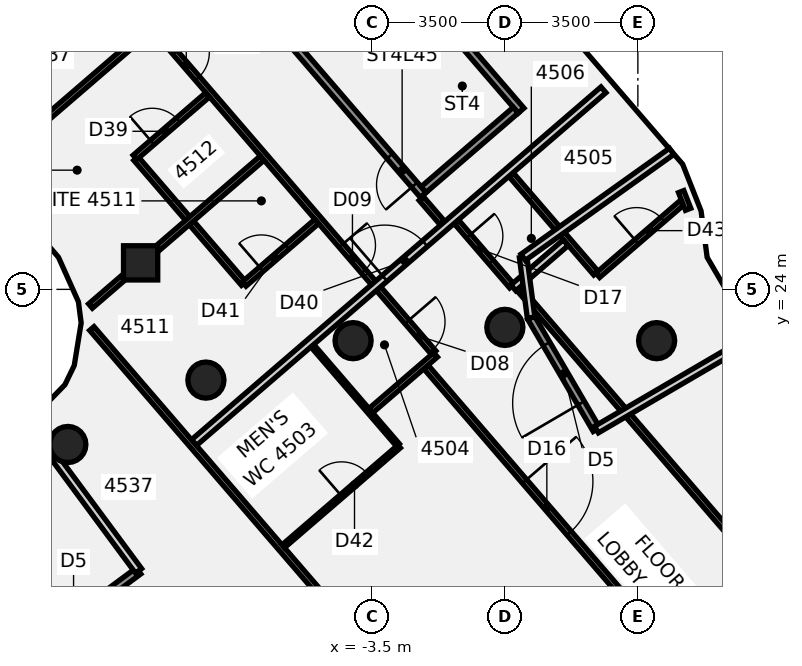
"""IFC4 building model, lengths in metres.
Left out: names, types, materials, properties, quantities, classifications, styles, units other than length and angle.
Written with IfcOpenShell. Run it as: python <this file> out.ifc"""

import sys

from ifc_helpers import new_model, si_unit, direction, frame, frame_2d, origin, origin_2d, place, context, subcontext, project, spatial, rectangle, circle, extrude, element, fill, save


model = new_model("IFC4")
c1 = context("Model", 3, precision=1e-05, world=origin(), true_north=direction((0.0, 1.0)))
c2 = subcontext(c1, "Body", "Model", "MODEL_VIEW")
j1 = project(units=[si_unit("LENGTHUNIT", "METRE"), si_unit("PLANEANGLEUNIT", "RADIAN")], contexts=[c1])
p1 = place(None, origin())
s1 = spatial("IfcSite", under=j1, at=p1, CompositionType="ELEMENT")
p2 = place(p1, origin())
s2 = spatial("IfcBuilding", under=s1, at=p2, CompositionType="ELEMENT")
p3 = place(p2, frame((0.0, 0.0, 182.5)))
s3 = spatial("IfcBuildingStorey", under=s2, at=p3, CompositionType="ELEMENT", Elevation=182.5)
for number, where, z_axis, x_axis in (
    (1, (3.994, 22.651, -0.14), (0.0, 0.0, 1.0), (1.0, 0.0, 0.0)),
    (2, (0.0, 23.0, -0.14), (0.0, 0.0, 1.0), (1.0, 0.0, 0.0)),
    (3, (-3.994, 22.651, -0.14), (0.0, 0.0, 1.0), (1.0, 0.0, 0.0)),
    (4, (-7.866, 21.613, -0.14), (0.0, 0.0, 1.0), (1.0, 0.0, 0.0)),
    (5, (-11.5, 19.919, -0.14), (0.0, 0.0, 1.0), (1.0, 0.0, 0.0)),
):
    element("IfcColumn", number, at=place(p3, frame(where, z_axis=z_axis, x_axis=x_axis)), inside=s3, PredefinedType="COLUMN", context=c2, shape_type="SweptSolid", body=[
        extrude(circle(Radius=0.475, at=origin_2d()), origin(), (0.0, 0.0, 1.0), 3.6),
    ])
p4 = place(p3, frame((-9.584, 24.698, -0.135), z_axis=(-0.013229584391, -0.048576320124, 0.998731855515), x_axis=(0.757717932984, 0.651247732409, 0.04171240903)))
e6 = element("IfcColumn", 6, at=p4, inside=s3, PredefinedType="COLUMN", context=c2, shape_type="SweptSolid", body=[
    extrude(rectangle(XDim=0.9, YDim=0.9, at=origin_2d()), origin(), (0.0, 0.0, 1.0), 3.599),
])
p5 = place(p3, frame((-9.706, 27.443, 0.0), z_axis=(0.0, 0.0, 1.0), x_axis=(0.652665803923, -0.757645925475, 0.0)))
e7 = element("IfcWall", 7, at=p5, inside=s3, PredefinedType="PARTITIONING", context=c2, shape_type="SweptSolid", body=[
    extrude(rectangle(XDim=4.34, YDim=0.15, at=frame_2d((2.17, 0.0))), origin(), (0.0, 0.0, 1.0), 2.864),
])
p6 = place(p3, frame((-12.149, 34.262, 0.0), z_axis=(0.0, 0.0, 1.0), x_axis=(0.652651241908, -0.75765846952, 0.0)))
e8 = element("IfcWall", 8, at=p6, inside=s3, PredefinedType="PARTITIONING", context=c2, shape_type="SweptSolid", body=[
    extrude(rectangle(XDim=15.745, YDim=0.15, at=frame_2d((7.873, 0.0))), origin(), (0.0, 0.0, 1.0), 2.864),
])
p7 = place(p6, frame((14.67, 0.0, 0.0)))
e9 = element("IfcOpeningElement", 9, at=p7, cuts=e8, PredefinedType="OPENING", context=c2, shape_type="SweptSolid", body=[
    extrude(rectangle(XDim=1.0, YDim=2.1, at=frame_2d((0.5, 1.05))), frame((0.0, 0.085, 0.0), z_axis=(0.0, -1.0, 0.0), x_axis=(1.0, 0.0, 0.0)), (0.0, 0.0, 1.0), 0.17),
])
p8 = place(p6, frame((12.02, 0.0, 0.0)))
e10 = element("IfcOpeningElement", 10, at=p8, cuts=e8, PredefinedType="OPENING", context=c2, shape_type="SweptSolid", body=[
    extrude(rectangle(XDim=0.9, YDim=2.1, at=frame_2d((0.45, 1.05))), frame((0.0, 0.085, 0.0), z_axis=(0.0, -1.0, 0.0), x_axis=(1.0, 0.0, 0.0)), (0.0, 0.0, 1.0), 0.17),
])
p9 = place(p6, frame((5.32, 0.0, 0.0)))
e11 = element("IfcOpeningElement", 11, at=p9, cuts=e8, PredefinedType="OPENING", context=c2, shape_type="SweptSolid", body=[
    extrude(rectangle(XDim=0.9, YDim=2.1, at=frame_2d((0.45, 1.05))), frame((0.0, 0.085, 0.0), z_axis=(0.0, -1.0, 0.0), x_axis=(1.0, 0.0, 0.0)), (0.0, 0.0, 1.0), 0.17),
])
p10 = place(p6, frame((3.02, 0.0, 0.0)))
e12 = element("IfcOpeningElement", 12, at=p10, cuts=e8, PredefinedType="OPENING", context=c2, shape_type="SweptSolid", body=[
    extrude(rectangle(XDim=0.9, YDim=2.1, at=frame_2d((0.45, 1.05))), frame((0.0, 0.085, 0.0), z_axis=(0.0, -1.0, 0.0), x_axis=(1.0, 0.0, 0.0)), (0.0, 0.0, 1.0), 0.17),
])
p11 = place(p3, frame((-10.868, 22.97, 0.0), z_axis=(0.0, 0.0, 1.0), x_axis=(0.652748053076, -0.757575065063, 0.0)))
e13 = element("IfcWall", 13, at=p11, inside=s3, PredefinedType="PARTITIONING", context=c2, shape_type="SweptSolid", body=[
    extrude(rectangle(XDim=14.472, YDim=0.15, at=frame_2d((7.236, 0.0))), origin(), (0.0, 0.0, 1.0), 2.864),
])
p12 = place(p3, frame((-2.198, 26.39, 0.0), z_axis=(0.0, 0.0, 1.0), x_axis=(0.652726981175, -0.757593220697, 0.0)))
e14 = element("IfcWall", 14, at=p12, inside=s3, PredefinedType="PARTITIONING", context=c2, shape_type="SweptSolid", body=[
    extrude(rectangle(XDim=0.84, YDim=0.15, at=frame_2d((0.42, 0.0))), origin(), (0.0, 0.0, 1.0), 2.864),
])
p13 = place(p3, frame((-5.067, 22.518, 0.0), z_axis=(0.0, 0.0, 1.0), x_axis=(0.652759016161, -0.757565618821, 0.0)))
e15 = element("IfcWall", 15, at=p13, inside=s3, PredefinedType="PARTITIONING", context=c2, shape_type="SweptSolid", body=[
    extrude(rectangle(XDim=3.45, YDim=0.1, at=frame_2d((1.725, 0.0))), origin(), (0.0, 0.0, 1.0), 2.864),
])
p14 = place(p3, frame((-2.074, 21.955, 0.0), z_axis=(0.0, 0.0, 1.0), x_axis=(0.652736603542, -0.757584930154, 0.0)))
e16 = element("IfcWall", 16, at=p14, inside=s3, PredefinedType="PARTITIONING", context=c2, shape_type="SweptSolid", body=[
    extrude(rectangle(XDim=13.133, YDim=0.15, at=frame_2d((6.566, 0.0))), origin(), (0.0, 0.0, 1.0), 2.864),
])
p15 = place(p14, frame((3.97, 0.0, 0.0)))
e17 = element("IfcOpeningElement", 17, at=p15, cuts=e16, PredefinedType="OPENING", context=c2, shape_type="SweptSolid", body=[
    extrude(rectangle(XDim=1.8, YDim=2.1, at=frame_2d((0.9, 1.05))), frame((0.0, 0.085, 0.0), z_axis=(0.0, -1.0, 0.0), x_axis=(1.0, 0.0, 0.0)), (0.0, 0.0, 1.0), 0.17),
])
p16 = place(p3, frame((-1.266, 25.767, 0.0), z_axis=(0.0, 0.0, 1.0), x_axis=(0.652880885414, -0.757460592679, 0.0)))
e18 = element("IfcWall", 18, at=p16, inside=s3, PredefinedType="PARTITIONING", context=c2, shape_type="SweptSolid", body=[
    extrude(rectangle(XDim=2.22, YDim=0.15, at=frame_2d((1.11, 0.0))), origin(), (0.0, 0.0, 1.0), 2.864),
])
p17 = place(p16, frame((0.48, 0.0, 0.0)))
e19 = element("IfcOpeningElement", 19, at=p17, cuts=e18, PredefinedType="OPENING", context=c2, shape_type="SweptSolid", body=[
    extrude(rectangle(XDim=0.9, YDim=2.1, at=frame_2d((0.45, 1.05))), frame((0.0, 0.085, 0.0), z_axis=(0.0, -1.0, 0.0), x_axis=(1.0, 0.0, 0.0)), (0.0, 0.0, 1.0), 0.17),
])
p18 = place(p3, frame((0.173, 27.007, 0.0), z_axis=(0.0, 0.0, 1.0), x_axis=(0.652861605441, -0.757477210311, 0.0)))
e20 = element("IfcWall", 20, at=p18, inside=s3, PredefinedType="PARTITIONING", context=c2, shape_type="SweptSolid", body=[
    extrude(rectangle(XDim=3.405, YDim=0.15, at=frame_2d((1.702, 0.0))), origin(), (0.0, 0.0, 1.0), 2.864),
])
p19 = place(p3, frame((0.376, 24.014, 0.0), z_axis=(0.0, 0.0, 1.0), x_axis=(0.652727037731, -0.75759317197, 0.0)))
e21 = element("IfcWall", 21, at=p19, inside=s3, PredefinedType="PARTITIONING", context=c2, shape_type="SweptSolid", body=[
    extrude(rectangle(XDim=15.2, YDim=0.15, at=frame_2d((7.6, 0.0))), origin(), (0.0, 0.0, 1.0), 2.864),
])
p20 = place(p19, frame((9.33, 0.0, 0.0)))
e22 = element("IfcOpeningElement", 22, at=p20, cuts=e21, PredefinedType="OPENING", context=c2, shape_type="SweptSolid", body=[
    extrude(rectangle(XDim=0.9, YDim=2.1, at=frame_2d((0.45, 1.05))), frame((0.0, 0.085, 0.0), z_axis=(0.0, -1.0, 0.0), x_axis=(1.0, 0.0, 0.0)), (0.0, 0.0, 1.0), 0.17),
])
p21 = place(p3, frame((-13.455, 27.303, 0.0), z_axis=(0.0, 0.0, 1.0), x_axis=(0.757581773841, 0.652740266832, 0.0)))
e23 = element("IfcWall", 23, at=p21, inside=s3, PredefinedType="PARTITIONING", context=c2, shape_type="SweptSolid", body=[
    extrude(rectangle(XDim=5.451, YDim=0.15, at=frame_2d((2.726, 0.0))), origin(), (0.0, 0.0, 1.0), 2.864),
])
p22 = place(p3, frame((-10.904, 23.561, 0.0), z_axis=(0.0, 0.0, 1.0), x_axis=(0.757575802877, 0.652747196773, 0.0)))
e24 = element("IfcWall", 24, at=p22, inside=s3, PredefinedType="PARTITIONING", context=c2, shape_type="SweptSolid", body=[
    extrude(rectangle(XDim=1.13, YDim=0.15, at=frame_2d((0.565, 0.0))), origin(), (0.0, 0.0, 1.0), 2.864),
])
p23 = place(p3, frame((-9.24, 24.994, 0.0), z_axis=(0.0, 0.0, 1.0), x_axis=(0.757602279322, 0.652716467056, 0.0)))
e25 = element("IfcWall", 25, at=p23, inside=s3, PredefinedType="PARTITIONING", context=c2, shape_type="SweptSolid", body=[
    extrude(rectangle(XDim=3.766, YDim=0.15, at=frame_2d((1.883, 0.0))), origin(), (0.0, 0.0, 1.0), 2.864),
])
p24 = place(p3, frame((-9.732, 27.474, 0.0), z_axis=(0.0, 0.0, 1.0), x_axis=(0.757495885979, 0.652839936528, 0.0)))
e26 = element("IfcWall", 26, at=p24, inside=s3, PredefinedType="PARTITIONING", context=c2, shape_type="SweptSolid", body=[
    extrude(rectangle(XDim=2.52, YDim=0.15, at=frame_2d((1.26, 0.0))), origin(), (0.0, 0.0, 1.0), 2.864),
])
p25 = place(p24, frame((0.6, 0.0, 0.0)))
e27 = element("IfcOpeningElement", 27, at=p25, cuts=e26, PredefinedType="OPENING", context=c2, shape_type="SweptSolid", body=[
    extrude(rectangle(XDim=0.9, YDim=2.1, at=frame_2d((0.45, 1.05))), frame((0.0, 0.085, 0.0), z_axis=(0.0, -1.0, 0.0), x_axis=(1.0, 0.0, 0.0)), (0.0, 0.0, 1.0), 0.17),
])
p26 = place(p3, frame((-8.177, 19.97, 0.0), z_axis=(0.0, 0.0, 1.0), x_axis=(0.757604641141, 0.652713725704, 0.0)))
e28 = element("IfcWall", 28, at=p26, inside=s3, PredefinedType="PARTITIONING", context=c2, shape_type="SweptSolid", body=[
    extrude(rectangle(XDim=14.219, YDim=0.2, at=frame_2d((7.109, 0.0))), origin(), (0.0, 0.0, 1.0), 2.864),
])
p27 = place(p26, frame((6.621, 0.0, 0.0)))
e29 = element("IfcOpeningElement", 29, at=p27, cuts=e28, PredefinedType="OPENING", context=c2, shape_type="SweptSolid", body=[
    extrude(rectangle(XDim=1.4, YDim=2.1, at=frame_2d((0.7, 1.05))), frame((0.0, 0.11, 0.0), z_axis=(0.0, -1.0, 0.0), x_axis=(1.0, 0.0, 0.0)), (0.0, 0.0, 1.0), 0.22),
])
p28 = place(p3, frame((-6.86, 24.141, 0.0), z_axis=(0.0, 0.0, 1.0), x_axis=(0.757495885979, 0.652839936528, 0.0)))
e30 = element("IfcWall", 30, at=p28, inside=s3, PredefinedType="PARTITIONING", context=c2, shape_type="SweptSolid", body=[
    extrude(rectangle(XDim=2.52, YDim=0.15, at=frame_2d((1.26, 0.0))), origin(), (0.0, 0.0, 1.0), 2.864),
])
p29 = place(p28, frame((0.6, 0.0, 0.0)))
e31 = element("IfcOpeningElement", 31, at=p29, cuts=e30, PredefinedType="OPENING", context=c2, shape_type="SweptSolid", body=[
    extrude(rectangle(XDim=0.9, YDim=2.1, at=frame_2d((0.45, 1.05))), frame((0.0, 0.085, 0.0), z_axis=(0.0, -1.0, 0.0), x_axis=(1.0, 0.0, 0.0)), (0.0, 0.0, 1.0), 0.17),
])
p30 = place(p3, frame((-5.831, 17.24, 0.0), z_axis=(0.0, 0.0, 1.0), x_axis=(0.757627148994, 0.652687599934, 0.0)))
e32 = element("IfcWall", 32, at=p30, inside=s3, PredefinedType="PARTITIONING", context=c2, shape_type="SweptSolid", body=[
    extrude(rectangle(XDim=4.025, YDim=0.1, at=frame_2d((2.012, 0.0))), origin(), (0.0, 0.0, 1.0), 2.864),
])
p31 = place(p30, frame((2.025, 0.0, 0.0)))
e33 = element("IfcOpeningElement", 33, at=p31, cuts=e32, PredefinedType="OPENING", context=c2, shape_type="SweptSolid", body=[
    extrude(rectangle(XDim=0.9, YDim=2.1, at=frame_2d((0.45, 1.05))), frame((0.0, 0.06, 0.0), z_axis=(0.0, -1.0, 0.0), x_axis=(1.0, 0.0, 0.0)), (0.0, 0.0, 1.0), 0.12),
])
p32 = place(p3, frame((2.445, 24.371, 0.0), z_axis=(0.0, 0.0, 1.0), x_axis=(0.757626487429, 0.652688367865, 0.0)))
e34 = element("IfcWall", 34, at=p32, inside=s3, PredefinedType="PARTITIONING", context=c2, shape_type="SweptSolid", body=[
    extrude(rectangle(XDim=2.922, YDim=0.15, at=frame_2d((1.461, 0.0))), origin(), (0.0, 0.0, 1.0), 2.864),
])
p33 = place(p32, frame((1.35, 0.0, 0.0)))
e35 = element("IfcOpeningElement", 35, at=p33, cuts=e34, PredefinedType="OPENING", context=c2, shape_type="SweptSolid", body=[
    extrude(rectangle(XDim=0.9, YDim=2.1, at=frame_2d((0.45, 1.05))), frame((0.0, 0.085, 0.0), z_axis=(0.0, -1.0, 0.0), x_axis=(1.0, 0.0, 0.0)), (0.0, 0.0, 1.0), 0.17),
])
p34 = place(p3, frame((-3.52, 20.815, 0.0), z_axis=(0.0, 0.0, 1.0), x_axis=(0.757545656349, 0.65278218308, 0.0)))
e36 = element("IfcWall", 36, at=p34, inside=s3, PredefinedType="PARTITIONING", context=c2, shape_type="SweptSolid", body=[
    extrude(rectangle(XDim=2.24, YDim=0.15, at=frame_2d((1.12, 0.0))), origin(), (0.0, 0.0, 1.0), 2.864),
])
p35 = place(p3, frame((0.223, 24.04, 0.0), z_axis=(0.0, 0.0, 1.0), x_axis=(0.757558670656, 0.652767079834, 0.0)))
e37 = element("IfcWall", 37, at=p35, inside=s3, PredefinedType="PARTITIONING", context=c2, shape_type="SweptSolid", body=[
    extrude(rectangle(XDim=1.82, YDim=0.2, at=frame_2d((0.91, 0.0))), origin(), (0.0, 0.0, 1.0), 2.864),
])
p36 = place(p3, frame((4.823, 26.107, 0.0), z_axis=(0.0, 0.0, 1.0), x_axis=(-0.366332317137, 0.930484085528, 0.0)))
e38 = element("IfcWall", 38, at=p36, inside=s3, PredefinedType="PARTITIONING", context=c2, shape_type="SweptSolid", body=[
    extrude(rectangle(XDim=0.5, YDim=0.15, at=frame_2d((0.25, 0.0))), origin(), (0.0, 0.0, 1.0), 2.864),
])
p37 = place(p3, frame((-9.639, 16.593, 0.0), z_axis=(0.0, 0.0, 1.0), x_axis=(-0.804072359199, -0.594531446748, 0.0)))
e39 = element("IfcWall", 39, at=p37, inside=s3, PredefinedType="SOLIDWALL", context=c2, shape_type="SweptSolid", body=[
    extrude(rectangle(XDim=4.254, YDim=0.2, at=frame_2d((2.127, 0.0))), origin(), (0.0, 0.0, 1.0), 2.964),
])
p38 = place(p37, frame((1.227, 0.0, 0.0)))
e40 = element("IfcOpeningElement", 40, at=p38, cuts=e39, PredefinedType="OPENING", context=c2, shape_type="SweptSolid", body=[
    extrude(rectangle(XDim=1.8, YDim=2.4, at=frame_2d((0.9, 1.2))), frame((0.0, 0.11, 0.0), z_axis=(0.0, -1.0, 0.0), x_axis=(1.0, 0.0, 0.0)), (0.0, 0.0, 1.0), 0.22),
])
p39 = place(p3, frame((-9.639, 16.593, 0.0), z_axis=(0.0, 0.0, 1.0), x_axis=(-0.594543730189, 0.804063276672, 0.0)))
e41 = element("IfcWall", 41, at=p39, inside=s3, PredefinedType="SOLIDWALL", context=c2, shape_type="SweptSolid", body=[
    extrude(rectangle(XDim=4.766, YDim=0.2, at=frame_2d((2.383, 0.0))), origin(), (0.0, 0.0, 1.0), 3.46),
])
p40 = place(p3, frame((2.411, 20.311, 0.0), z_axis=(0.0, 0.0, 1.0), x_axis=(-0.504400373358, 0.863469897192, 0.0)))
e42 = element("IfcWall", 42, at=p40, inside=s3, PredefinedType="SOLIDWALL", context=c2, shape_type="SweptSolid", body=[
    extrude(rectangle(XDim=3.412, YDim=0.2, at=frame_2d((1.706, 0.0))), origin(), (0.0, 0.0, 1.0), 3.46),
])
p41 = place(p40, frame((0.806, 0.0, 0.0)))
e43 = element("IfcOpeningElement", 43, at=p41, cuts=e42, PredefinedType="OPENING", context=c2, shape_type="SweptSolid", body=[
    extrude(rectangle(XDim=1.8, YDim=2.4, at=frame_2d((0.9, 1.2))), frame((0.0, 0.11, 0.0), z_axis=(0.0, -1.0, 0.0), x_axis=(1.0, 0.0, 0.0)), (0.0, 0.0, 1.0), 0.22),
])
p42 = place(p3, frame((2.411, 20.312, 0.0), z_axis=(0.0, 0.0, 1.0), x_axis=(0.863468462435, 0.504402829472, 0.0)))
e44 = element("IfcWall", 44, at=p42, inside=s3, PredefinedType="SOLIDWALL", context=c2, shape_type="SweptSolid", body=[
    extrude(rectangle(XDim=5.251, YDim=0.2, at=frame_2d((2.625, 0.0))), origin(), (0.0, 0.0, 1.0), 2.964),
])
p43 = place(p3, frame((0.69, 23.257, 0.0), z_axis=(0.0, 0.0, 1.0), x_axis=(-0.130395335876, 0.991462080153, 0.0)))
e45 = element("IfcWall", 45, at=p43, inside=s3, PredefinedType="SOLIDWALL", context=c2, shape_type="SweptSolid", body=[
    extrude(rectangle(XDim=1.601, YDim=0.2, at=frame_2d((0.8, 0.0))), origin(), (0.0, 0.0, 1.0), 3.46),
])
p44 = place(p3, frame((0.482, 24.844, 0.0), z_axis=(0.0, 0.0, 1.0), x_axis=(0.813929369959, 0.580963837702, 0.0)))
e46 = element("IfcWall", 46, at=p44, inside=s3, PredefinedType="SOLIDWALL", context=c2, shape_type="SweptSolid", body=[
    extrude(rectangle(XDim=4.799, YDim=0.2, at=frame_2d((2.399, 0.0))), origin(), (0.0, 0.0, 1.0), 3.46),
])
p45 = place(p3, frame((-2.148, 26.485, -0.14), z_axis=(0.0, 0.0, 1.0), x_axis=(-0.6527428112, 0.75757958158, 0.0)))
e47 = element("IfcWall", 47, at=p45, inside=s3, PredefinedType="SHEAR", context=c2, shape_type="SweptSolid", body=[
    extrude(rectangle(XDim=6.7, YDim=0.2, at=frame_2d((3.35, 0.0))), origin(), (0.0, 0.0, 1.0), 3.004),
])
p46 = place(p45, frame((0.35, 0.0, 0.0)))
e48 = element("IfcOpeningElement", 48, at=p46, cuts=e47, PredefinedType="OPENING", context=c2, shape_type="SweptSolid", body=[
    extrude(rectangle(XDim=1.0, YDim=2.1, at=frame_2d((0.5, 1.05))), frame((0.0, 0.11, 0.0), z_axis=(0.0, -1.0, 0.0), x_axis=(1.0, 0.0, 0.0)), (0.0, 0.0, 1.0), 0.22),
])
p47 = place(p3, frame((0.427, 28.704, -0.14), z_axis=(0.0, 0.0, 1.0), x_axis=(-0.652703877257, 0.757613125952, 0.0)))
e49 = element("IfcWall", 49, at=p47, inside=s3, PredefinedType="SHEAR", context=c2, shape_type="SweptSolid", body=[
    extrude(rectangle(XDim=6.7, YDim=0.2, at=frame_2d((3.35, 0.0))), origin(), (0.0, 0.0, 1.0), 3.004),
])
p48 = place(p3, frame((0.287, 28.715, -0.14), z_axis=(0.0, 0.0, 1.0), x_axis=(-0.757611592596, -0.652705657065, 0.0)))
e50 = element("IfcWall", 50, at=p48, inside=s3, PredefinedType="SHEAR", context=c2, shape_type="SweptSolid", body=[
    extrude(rectangle(XDim=3.2, YDim=0.2, at=frame_2d((1.6, 0.0))), origin(), (0.0, 0.0, 1.0), 3.004),
])
p49 = place(p7, frame((1.0, 0.0, 0.0), z_axis=(0.0, 0.0, 1.0), x_axis=(-1.0, 0.0, 0.0)))
e51 = element("IfcDoor", 51, at=p49, inside=s3, OperationType="SINGLE_SWING_RIGHT", PredefinedType="DOOR", context=c2, shape_type="SweptSolid", body=[
    extrude(rectangle(XDim=1.0, YDim=2.1, at=frame_2d((0.5, 1.05))), frame((0.0, 0.025, 0.0), z_axis=(0.0, -1.0, 0.0), x_axis=(1.0, 0.0, 0.0)), (0.0, 0.0, 1.0), 0.05),
])
fill(e9, e51)
p50 = place(p8, frame((0.9, 0.0, 0.0), z_axis=(0.0, 0.0, 1.0), x_axis=(-1.0, 0.0, 0.0)))
e52 = element("IfcDoor", 52, at=p50, inside=s3, OperationType="SINGLE_SWING_RIGHT", PredefinedType="DOOR", context=c2, shape_type="SweptSolid", body=[
    extrude(rectangle(XDim=0.9, YDim=2.1, at=frame_2d((0.45, 1.05))), frame((0.0, 0.025, 0.0), z_axis=(0.0, -1.0, 0.0), x_axis=(1.0, 0.0, 0.0)), (0.0, 0.0, 1.0), 0.05),
])
fill(e10, e52)
p51 = place(p9, frame((0.9, 0.0, 0.0), z_axis=(0.0, 0.0, 1.0), x_axis=(-1.0, 0.0, 0.0)))
e53 = element("IfcDoor", 53, at=p51, inside=s3, OperationType="SINGLE_SWING_LEFT", PredefinedType="DOOR", context=c2, shape_type="SweptSolid", body=[
    extrude(rectangle(XDim=0.9, YDim=2.1, at=frame_2d((0.45, 1.05))), frame((0.0, 0.025, 0.0), z_axis=(0.0, -1.0, 0.0), x_axis=(1.0, 0.0, 0.0)), (0.0, 0.0, 1.0), 0.05),
])
fill(e11, e53)
p52 = place(p15, frame((1.8, 0.0, 0.0), z_axis=(0.0, 0.0, 1.0), x_axis=(-1.0, 0.0, 0.0)))
e54 = element("IfcDoor", 54, at=p52, inside=s3, OperationType="DOUBLE_DOOR_SINGLE_SWING", PredefinedType="DOOR", context=c2, shape_type="SweptSolid", body=[
    extrude(rectangle(XDim=1.8, YDim=2.1, at=frame_2d((0.9, 1.05))), frame((0.0, 0.025, 0.0), z_axis=(0.0, -1.0, 0.0), x_axis=(1.0, 0.0, 0.0)), (0.0, 0.0, 1.0), 0.05),
])
fill(e17, e54)
p53 = place(p17, origin())
e55 = element("IfcDoor", 55, at=p53, inside=s3, OperationType="SINGLE_SWING_RIGHT", PredefinedType="DOOR", context=c2, shape_type="SweptSolid", body=[
    extrude(rectangle(XDim=0.9, YDim=2.1, at=frame_2d((0.45, 1.05))), frame((0.0, 0.025, 0.0), z_axis=(0.0, -1.0, 0.0), x_axis=(1.0, 0.0, 0.0)), (0.0, 0.0, 1.0), 0.05),
])
fill(e19, e55)
p54 = place(p25, frame((0.9, 0.0, 0.0), z_axis=(0.0, 0.0, 1.0), x_axis=(-1.0, 0.0, 0.0)))
e56 = element("IfcDoor", 56, at=p54, inside=s3, OperationType="SINGLE_SWING_LEFT", PredefinedType="DOOR", context=c2, shape_type="SweptSolid", body=[
    extrude(rectangle(XDim=0.9, YDim=2.1, at=frame_2d((0.45, 1.05))), frame((0.0, 0.025, 0.0), z_axis=(0.0, -1.0, 0.0), x_axis=(1.0, 0.0, 0.0)), (0.0, 0.0, 1.0), 0.05),
])
fill(e27, e56)
p55 = place(p27, frame((1.4, 0.0, 0.0), z_axis=(0.0, 0.0, 1.0), x_axis=(-1.0, 0.0, 0.0)))
e57 = element("IfcDoor", 57, at=p55, inside=s3, OperationType="DOUBLE_DOOR_SINGLE_SWING", PredefinedType="DOOR", context=c2, shape_type="SweptSolid", body=[
    extrude(rectangle(XDim=1.4, YDim=2.1, at=frame_2d((0.7, 1.05))), frame((0.0, 0.025, 0.0), z_axis=(0.0, -1.0, 0.0), x_axis=(1.0, 0.0, 0.0)), (0.0, 0.0, 1.0), 0.05),
])
fill(e29, e57)
p56 = place(p29, origin())
e58 = element("IfcDoor", 58, at=p56, inside=s3, OperationType="SINGLE_SWING_RIGHT", PredefinedType="DOOR", context=c2, shape_type="SweptSolid", body=[
    extrude(rectangle(XDim=0.9, YDim=2.1, at=frame_2d((0.45, 1.05))), frame((0.0, 0.025, 0.0), z_axis=(0.0, -1.0, 0.0), x_axis=(1.0, 0.0, 0.0)), (0.0, 0.0, 1.0), 0.05),
])
fill(e31, e58)
p57 = place(p31, origin())
e59 = element("IfcDoor", 59, at=p57, inside=s3, OperationType="SINGLE_SWING_LEFT", PredefinedType="DOOR", context=c2, shape_type="SweptSolid", body=[
    extrude(rectangle(XDim=0.9, YDim=2.1, at=frame_2d((0.45, 1.05))), frame((0.0, 0.025, 0.0), z_axis=(0.0, -1.0, 0.0), x_axis=(1.0, 0.0, 0.0)), (0.0, 0.0, 1.0), 0.05),
])
fill(e33, e59)
p58 = place(p33, origin())
e60 = element("IfcDoor", 60, at=p58, inside=s3, OperationType="SINGLE_SWING_LEFT", PredefinedType="DOOR", context=c2, shape_type="SweptSolid", body=[
    extrude(rectangle(XDim=0.9, YDim=2.1, at=frame_2d((0.45, 1.05))), frame((0.0, 0.025, 0.0), z_axis=(0.0, -1.0, 0.0), x_axis=(1.0, 0.0, 0.0)), (0.0, 0.0, 1.0), 0.05),
])
fill(e35, e60)
p59 = place(p41, origin())
e61 = element("IfcDoor", 61, at=p59, inside=s3, OperationType="SINGLE_SWING_LEFT", PredefinedType="DOOR", context=c2, shape_type="SweptSolid", body=[
    extrude(rectangle(XDim=1.8, YDim=2.4, at=frame_2d((0.9, 1.2))), frame((0.0, 0.025, 0.0), z_axis=(0.0, -1.0, 0.0), x_axis=(1.0, 0.0, 0.0)), (0.0, 0.0, 1.0), 0.05),
])
fill(e43, e61)
p60 = place(p46, origin())
e62 = element("IfcDoor", 62, at=p60, inside=s3, OperationType="SINGLE_SWING_LEFT", PredefinedType="DOOR", context=c2, shape_type="SweptSolid", body=[
    extrude(rectangle(XDim=1.0, YDim=2.1, at=frame_2d((0.5, 1.05))), frame((0.0, 0.025, 0.0), z_axis=(0.0, -1.0, 0.0), x_axis=(1.0, 0.0, 0.0)), (0.0, 0.0, 1.0), 0.05),
])
fill(e48, e62)
save(model, sys.argv[1])
